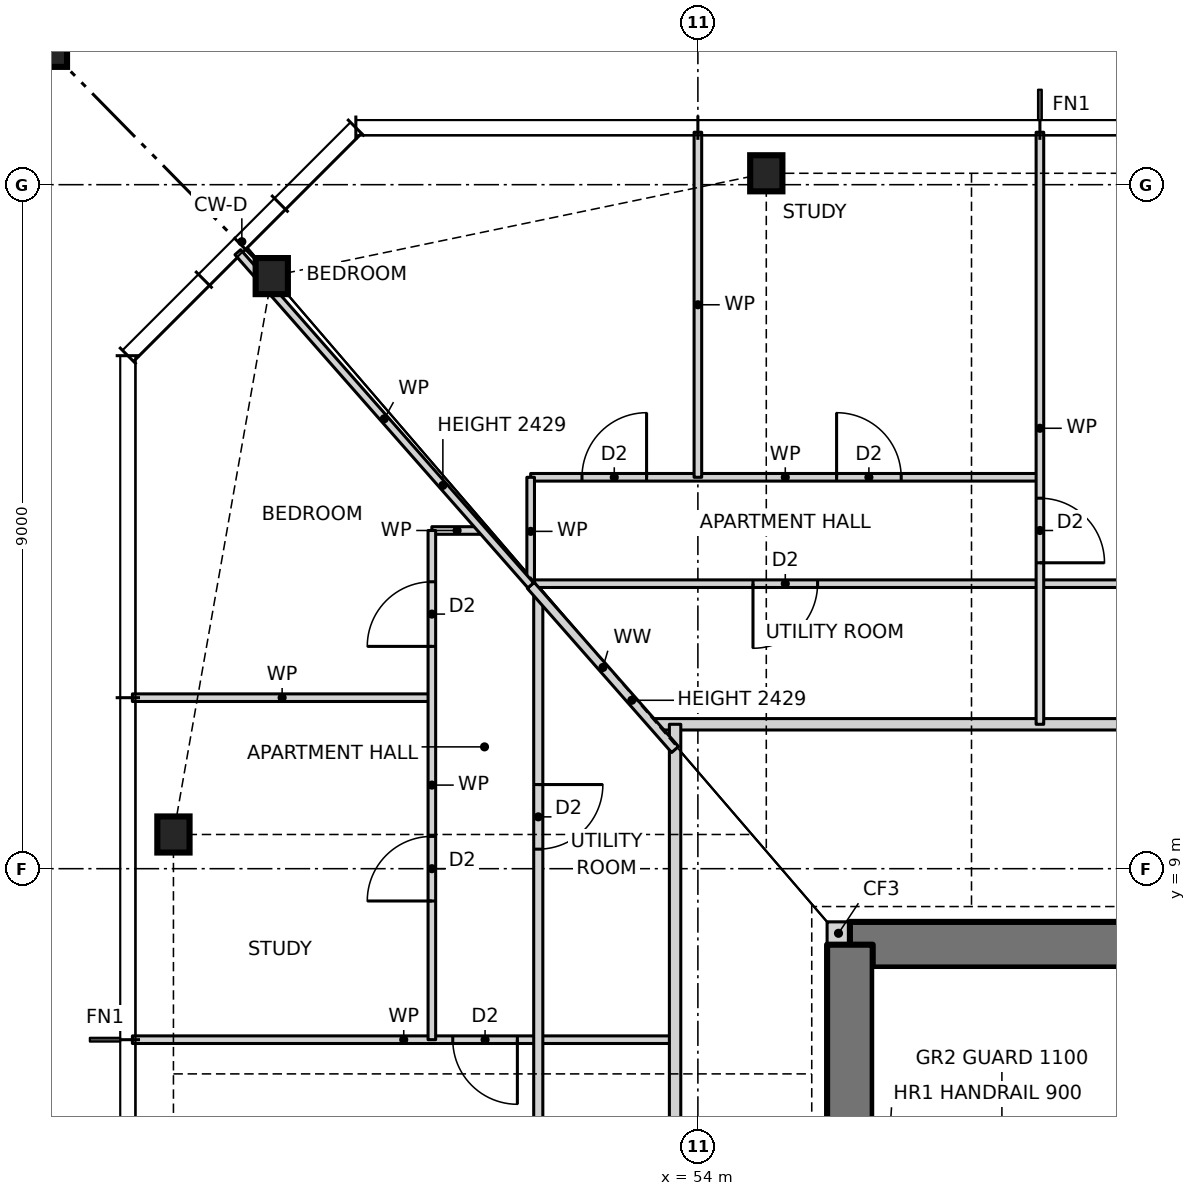
"""IFC4 building model, lengths in metres.
Left out: names, types, materials, properties, quantities, classifications, styles, units other than length and angle.
Written with IfcOpenShell. Run it as: python <this file> out.ifc"""

import sys

from ifc_helpers import new_model, si_unit, direction, frame, frame_2d, origin, origin_2d, place, context, subcontext, project, spatial, rectangle, hollow_rectangle, i_section, extrude, element, fill, save


model = new_model("IFC4")
c1 = context("Model", 3, precision=1e-05, world=origin(), true_north=direction((0.0, 1.0)))
c2 = subcontext(c1, "Body", "Model", "MODEL_VIEW")
j1 = project(units=[si_unit("LENGTHUNIT", "METRE"), si_unit("PLANEANGLEUNIT", "RADIAN")], contexts=[c1])
p1 = place(None, origin())
s1 = spatial("IfcSite", under=j1, at=p1, CompositionType="ELEMENT")
p2 = place(p1, origin())
s2 = spatial("IfcBuilding", under=s1, at=p2, CompositionType="ELEMENT")
p3 = place(p2, frame((0.0, 0.0, 39.5)))
s3 = spatial("IfcBuildingStorey", under=s2, at=p3, CompositionType="ELEMENT", Elevation=39.5)
for number, where, z_axis, x_axis in (
    (1, (54.9, 18.15, 0.0), (0.0, 0.0, 1.0), (1.0, 0.0, 0.0)),
    (2, (48.394, 16.797, 0.0), (0.0, 0.0, 1.0), (1.0, 0.0, 0.0)),
    (3, (47.1, 9.45, 0.0), (0.0, 0.0, 1.0), (1.0, 0.0, 0.0)),
):
    element("IfcColumn", number, at=place(p3, frame(where, z_axis=z_axis, x_axis=x_axis)), inside=s3, PredefinedType="COLUMN", context=c2, shape_type="SweptSolid", body=[
        extrude(i_section(OverallWidth=0.424, OverallDepth=0.475, WebThickness=0.048, FlangeThickness=0.077, at=origin_2d()), origin(), (0.0, 0.0, 1.0), 3.5),
    ])
p4 = place(p3, frame((45.1, 20.15, 0.0), z_axis=(0.0, 0.0, 1.0), x_axis=(1.0, 0.0, 0.0)))
e4 = element("IfcColumn", 4, at=p4, inside=s3, PredefinedType="COLUMN", context=c2, shape_type="SweptSolid", body=[
    extrude(hollow_rectangle(XDim=1.2, YDim=1.2, WallThickness=0.07, at=origin_2d()), origin(), (0.0, 0.0, 1.0), 3.5),
])
p5 = place(p3, frame((55.7, 8.15, 0.0), z_axis=(0.0, 0.0, 1.0), x_axis=(1.0, 0.0, 0.0)))
e5 = element("IfcWall", 5, at=p5, inside=s3, PredefinedType="SOLIDWALL", context=c2, shape_type="SweptSolid", body=[
    extrude(rectangle(XDim=0.3, YDim=0.3, at=frame_2d((0.15, 0.0))), origin(), (0.0, 0.0, 1.0), 3.5),
])
p6 = place(p3, frame((70.0, 8.0, 0.0), z_axis=(0.0, 0.0, 1.0), x_axis=(-1.0, 0.0, 0.0)))
e6 = element("IfcWall", 6, at=p6, inside=s3, PredefinedType="SHEAR", context=c2, shape_type="SweptSolid", body=[
    extrude(rectangle(XDim=14.0, YDim=0.6, at=frame_2d((7.0, 0.0))), origin(), (0.0, 0.0, 1.0), 3.5),
])
p7 = place(p6, frame((8.2, 0.0, 0.0)))
e7 = element("IfcOpeningElement", 7, at=p7, cuts=e6, PredefinedType="OPENING", context=c2, shape_type="SweptSolid", body=[
    extrude(rectangle(XDim=0.9, YDim=2.1, at=frame_2d((0.45, 1.05))), frame((0.0, 0.31, 0.0), z_axis=(0.0, -1.0, 0.0), x_axis=(1.0, 0.0, 0.0)), (0.0, 0.0, 1.0), 0.62),
])
p8 = place(p6, frame((3.2, 0.0, 0.0)))
e8 = element("IfcOpeningElement", 8, at=p8, cuts=e6, PredefinedType="OPENING", context=c2, shape_type="SweptSolid", body=[
    extrude(rectangle(XDim=0.9, YDim=2.1, at=frame_2d((0.45, 1.05))), frame((0.0, 0.31, 0.0), z_axis=(0.0, -1.0, 0.0), x_axis=(1.0, 0.0, 0.0)), (0.0, 0.0, 1.0), 0.62),
])
p9 = place(p3, frame((56.0, 8.0, 0.0), z_axis=(0.0, 0.0, 1.0), x_axis=(0.0, -1.0, 0.0)))
e9 = element("IfcWall", 9, at=p9, inside=s3, PredefinedType="SHEAR", context=c2, shape_type="SweptSolid", body=[
    extrude(rectangle(XDim=16.0, YDim=0.6, at=frame_2d((8.0, 0.0))), origin(), (0.0, 0.0, 1.0), 3.5),
])
p10 = place(p9, frame((7.5, 0.0, 0.0)))
e10 = element("IfcOpeningElement", 10, at=p10, cuts=e9, PredefinedType="OPENING", context=c2, shape_type="SweptSolid", body=[
    extrude(rectangle(XDim=1.0, YDim=2.1, at=frame_2d((0.5, 1.05))), frame((0.0, 0.31, 0.0), z_axis=(0.0, -1.0, 0.0), x_axis=(1.0, 0.0, 0.0)), (0.0, 0.0, 1.0), 0.62),
])
p11 = place(p3, frame((46.56, 6.75, 0.0), z_axis=(0.0, 0.0, 1.0), x_axis=(1.0, 0.0, 0.0)))
e11 = element("IfcWall", 11, at=p11, inside=s3, PredefinedType="PARTITIONING", context=c2, shape_type="SweptSolid", body=[
    extrude(rectangle(XDim=7.14, YDim=0.1, at=frame_2d((3.57, 0.0))), origin(), (0.0, 0.0, 1.0), 3.27),
])
p12 = place(p11, frame((4.215, 0.0, 0.0)))
e12 = element("IfcOpeningElement", 12, at=p12, cuts=e11, PredefinedType="OPENING", context=c2, shape_type="SweptSolid", body=[
    extrude(rectangle(XDim=0.85, YDim=2.1, at=frame_2d((0.425, 1.05))), frame((0.0, 0.06, 0.0), z_axis=(0.0, -1.0, 0.0), x_axis=(1.0, 0.0, 0.0)), (0.0, 0.0, 1.0), 0.12),
])
p13 = place(p3, frame((53.408, 10.9, 0.0), z_axis=(0.0, 0.0, 1.0), x_axis=(1.0, 0.0, 0.0)))
e13 = element("IfcWall", 13, at=p13, inside=s3, PredefinedType="PARTITIONING", context=c2, shape_type="SweptSolid", body=[
    extrude(rectangle(XDim=19.184, YDim=0.15, at=frame_2d((9.592, 0.0))), origin(), (0.0, 0.0, 1.0), 3.27),
])
p14 = place(p13, frame((8.592, 0.0, 0.0)))
e14 = element("IfcOpeningElement", 14, at=p14, cuts=e13, PredefinedType="OPENING", context=c2, shape_type="SweptSolid", body=[
    extrude(rectangle(XDim=1.0, YDim=2.1, at=frame_2d((0.5, 1.05))), frame((0.0, 0.085, 0.0), z_axis=(0.0, -1.0, 0.0), x_axis=(1.0, 0.0, 0.0)), (0.0, 0.0, 1.0), 0.17),
])
p15 = place(p3, frame((46.56, 11.25, 0.0), z_axis=(0.0, 0.0, 1.0), x_axis=(1.0, 0.0, 0.0)))
e15 = element("IfcWall", 15, at=p15, inside=s3, PredefinedType="PARTITIONING", context=c2, shape_type="SweptSolid", body=[
    extrude(rectangle(XDim=3.94, YDim=0.1, at=frame_2d((1.97, 0.0))), origin(), (0.0, 0.0, 1.0), 3.27),
])
p16 = place(p3, frame((51.8, 12.75, 0.0), z_axis=(0.0, 0.0, 1.0), x_axis=(1.0, 0.0, 0.0)))
e16 = element("IfcWall", 16, at=p16, inside=s3, PredefinedType="PARTITIONING", context=c2, shape_type="SweptSolid", body=[
    extrude(rectangle(XDim=22.4, YDim=0.1, at=frame_2d((11.2, 0.0))), origin(), (0.0, 0.0, 1.0), 3.27),
])
p17 = place(p16, frame((13.475, 0.0, 0.0)))
e17 = element("IfcOpeningElement", 17, at=p17, cuts=e16, PredefinedType="OPENING", context=c2, shape_type="SweptSolid", body=[
    extrude(rectangle(XDim=0.85, YDim=2.1, at=frame_2d((0.425, 1.05))), frame((0.0, 0.06, 0.0), z_axis=(0.0, -1.0, 0.0), x_axis=(1.0, 0.0, 0.0)), (0.0, 0.0, 1.0), 0.12),
])
p18 = place(p16, frame((10.275, 0.0, 0.0)))
e18 = element("IfcOpeningElement", 18, at=p18, cuts=e16, PredefinedType="OPENING", context=c2, shape_type="SweptSolid", body=[
    extrude(rectangle(XDim=0.85, YDim=2.1, at=frame_2d((0.425, 1.05))), frame((0.0, 0.06, 0.0), z_axis=(0.0, -1.0, 0.0), x_axis=(1.0, 0.0, 0.0)), (0.0, 0.0, 1.0), 0.12),
])
p19 = place(p16, frame((18.625, 0.0, 0.0)))
e19 = element("IfcOpeningElement", 19, at=p19, cuts=e16, PredefinedType="OPENING", context=c2, shape_type="SweptSolid", body=[
    extrude(rectangle(XDim=0.85, YDim=2.1, at=frame_2d((0.425, 1.05))), frame((0.0, 0.06, 0.0), z_axis=(0.0, -1.0, 0.0), x_axis=(1.0, 0.0, 0.0)), (0.0, 0.0, 1.0), 0.12),
])
p20 = place(p16, frame((2.925, 0.0, 0.0)))
e20 = element("IfcOpeningElement", 20, at=p20, cuts=e16, PredefinedType="OPENING", context=c2, shape_type="SweptSolid", body=[
    extrude(rectangle(XDim=0.85, YDim=2.1, at=frame_2d((0.425, 1.05))), frame((0.0, 0.06, 0.0), z_axis=(0.0, -1.0, 0.0), x_axis=(1.0, 0.0, 0.0)), (0.0, 0.0, 1.0), 0.12),
])
p21 = place(p3, frame((50.5, 13.45, 0.0), z_axis=(0.0, 0.0, 1.0), x_axis=(1.0, 0.0, 0.0)))
e21 = element("IfcWall", 21, at=p21, inside=s3, PredefinedType="PARTITIONING", context=c2, shape_type="SweptSolid", body=[
    extrude(rectangle(XDim=0.664, YDim=0.1, at=frame_2d((0.332, 0.0))), origin(), (0.0, 0.0, 1.0), 3.27),
])
p22 = place(p3, frame((51.8, 14.15, 0.0), z_axis=(0.0, 0.0, 1.0), x_axis=(1.0, 0.0, 0.0)))
e22 = element("IfcWall", 22, at=p22, inside=s3, PredefinedType="PARTITIONING", context=c2, shape_type="SweptSolid", body=[
    extrude(rectangle(XDim=6.7, YDim=0.1, at=frame_2d((3.35, 0.0))), origin(), (0.0, 0.0, 1.0), 3.27),
])
p23 = place(p22, frame((4.025, 0.0, 0.0)))
e23 = element("IfcOpeningElement", 23, at=p23, cuts=e22, PredefinedType="OPENING", context=c2, shape_type="SweptSolid", body=[
    extrude(rectangle(XDim=0.85, YDim=2.1, at=frame_2d((0.425, 1.05))), frame((0.0, 0.06, 0.0), z_axis=(0.0, -1.0, 0.0), x_axis=(1.0, 0.0, 0.0)), (0.0, 0.0, 1.0), 0.12),
])
p24 = place(p22, frame((0.675, 0.0, 0.0)))
e24 = element("IfcOpeningElement", 24, at=p24, cuts=e22, PredefinedType="OPENING", context=c2, shape_type="SweptSolid", body=[
    extrude(rectangle(XDim=0.85, YDim=2.1, at=frame_2d((0.425, 1.05))), frame((0.0, 0.06, 0.0), z_axis=(0.0, -1.0, 0.0), x_axis=(1.0, 0.0, 0.0)), (0.0, 0.0, 1.0), 0.12),
])
p25 = place(p3, frame((58.5, 10.9, 0.0), z_axis=(0.0, 0.0, 1.0), x_axis=(0.0, 1.0, 0.0)))
e25 = element("IfcWall", 25, at=p25, inside=s3, PredefinedType="PARTITIONING", context=c2, shape_type="SweptSolid", body=[
    extrude(rectangle(XDim=7.79, YDim=0.1, at=frame_2d((3.895, 0.0))), origin(), (0.0, 0.0, 1.0), 3.27),
])
p26 = place(p25, frame((2.125, 0.0, 0.0)))
e26 = element("IfcOpeningElement", 26, at=p26, cuts=e25, PredefinedType="OPENING", context=c2, shape_type="SweptSolid", body=[
    extrude(rectangle(XDim=0.85, YDim=2.1, at=frame_2d((0.425, 1.05))), frame((0.0, 0.06, 0.0), z_axis=(0.0, -1.0, 0.0), x_axis=(1.0, 0.0, 0.0)), (0.0, 0.0, 1.0), 0.12),
])
p27 = place(p3, frame((54.0, 14.15, 0.0), z_axis=(0.0, 0.0, 1.0), x_axis=(0.0, 1.0, 0.0)))
e27 = element("IfcWall", 27, at=p27, inside=s3, PredefinedType="PARTITIONING", context=c2, shape_type="SweptSolid", body=[
    extrude(rectangle(XDim=4.54, YDim=0.1, at=frame_2d((2.27, 0.0))), origin(), (0.0, 0.0, 1.0), 3.27),
])
p28 = place(p3, frame((53.7, -10.568, 0.0), z_axis=(0.0, 0.0, 1.0), x_axis=(0.0, 1.0, 0.0)))
e28 = element("IfcWall", 28, at=p28, inside=s3, PredefinedType="PARTITIONING", context=c2, shape_type="SweptSolid", body=[
    extrude(rectangle(XDim=21.468, YDim=0.15, at=frame_2d((10.734, 0.0))), origin(), (0.0, 0.0, 1.0), 3.27),
])
p29 = place(p28, frame((11.818, 0.0, 0.0)))
e29 = element("IfcOpeningElement", 29, at=p29, cuts=e28, PredefinedType="OPENING", context=c2, shape_type="SweptSolid", body=[
    extrude(rectangle(XDim=1.0, YDim=2.1, at=frame_2d((0.5, 1.05))), frame((0.0, 0.085, 0.0), z_axis=(0.0, -1.0, 0.0), x_axis=(1.0, 0.0, 0.0)), (0.0, 0.0, 1.0), 0.17),
])
p30 = place(p3, frame((51.9, -12.614, 0.0), z_axis=(0.0, 0.0, 1.0), x_axis=(0.0, 1.0, 0.0)))
e30 = element("IfcWall", 30, at=p30, inside=s3, PredefinedType="PARTITIONING", context=c2, shape_type="SweptSolid", body=[
    extrude(rectangle(XDim=25.228, YDim=0.12, at=frame_2d((12.614, 0.0))), origin(), (0.0, 0.0, 1.0), 3.27),
])
p31 = place(p30, frame((17.139, 0.0, 0.0)))
e31 = element("IfcOpeningElement", 31, at=p31, cuts=e30, PredefinedType="OPENING", context=c2, shape_type="SweptSolid", body=[
    extrude(rectangle(XDim=0.85, YDim=2.1, at=frame_2d((0.425, 1.05))), frame((0.0, 0.07, 0.0), z_axis=(0.0, -1.0, 0.0), x_axis=(1.0, 0.0, 0.0)), (0.0, 0.0, 1.0), 0.14),
])
p32 = place(p30, frame((13.939, 0.0, 0.0)))
e32 = element("IfcOpeningElement", 32, at=p32, cuts=e30, PredefinedType="OPENING", context=c2, shape_type="SweptSolid", body=[
    extrude(rectangle(XDim=0.85, YDim=2.1, at=frame_2d((0.425, 1.05))), frame((0.0, 0.07, 0.0), z_axis=(0.0, -1.0, 0.0), x_axis=(1.0, 0.0, 0.0)), (0.0, 0.0, 1.0), 0.14),
])
p33 = place(p30, frame((21.871, 0.0, 0.0)))
e33 = element("IfcOpeningElement", 33, at=p33, cuts=e30, PredefinedType="OPENING", context=c2, shape_type="SweptSolid", body=[
    extrude(rectangle(XDim=0.85, YDim=2.1, at=frame_2d((0.425, 1.05))), frame((0.0, 0.07, 0.0), z_axis=(0.0, -1.0, 0.0), x_axis=(1.0, 0.0, 0.0)), (0.0, 0.0, 1.0), 0.14),
])
p34 = place(p30, frame((7.739, 0.0, 0.0)))
e34 = element("IfcOpeningElement", 34, at=p34, cuts=e30, PredefinedType="OPENING", context=c2, shape_type="SweptSolid", body=[
    extrude(rectangle(XDim=0.85, YDim=2.1, at=frame_2d((0.425, 1.05))), frame((0.0, 0.07, 0.0), z_axis=(0.0, -1.0, 0.0), x_axis=(1.0, 0.0, 0.0)), (0.0, 0.0, 1.0), 0.14),
])
p35 = place(p30, frame((2.557, 0.0, 0.0)))
e35 = element("IfcOpeningElement", 35, at=p35, cuts=e30, PredefinedType="OPENING", context=c2, shape_type="SweptSolid", body=[
    extrude(rectangle(XDim=0.85, YDim=2.1, at=frame_2d((0.425, 1.05))), frame((0.0, 0.07, 0.0), z_axis=(0.0, -1.0, 0.0), x_axis=(1.0, 0.0, 0.0)), (0.0, 0.0, 1.0), 0.14),
])
p36 = place(p3, frame((51.8, 12.727, 0.0), z_axis=(0.0, 0.0, 1.0), x_axis=(0.0, 1.0, 0.0)))
e36 = element("IfcWall", 36, at=p36, inside=s3, PredefinedType="PARTITIONING", context=c2, shape_type="SweptSolid", body=[
    extrude(rectangle(XDim=1.423, YDim=0.1, at=frame_2d((0.711, 0.0))), origin(), (0.0, 0.0, 1.0), 3.27),
])
p37 = place(p3, frame((50.5, 6.75, 0.0), z_axis=(0.0, 0.0, 1.0), x_axis=(0.0, 1.0, 0.0)))
e37 = element("IfcWall", 37, at=p37, inside=s3, PredefinedType="PARTITIONING", context=c2, shape_type="SweptSolid", body=[
    extrude(rectangle(XDim=6.7, YDim=0.1, at=frame_2d((3.35, 0.0))), origin(), (0.0, 0.0, 1.0), 3.27),
])
p38 = place(p37, frame((1.825, 0.0, 0.0)))
e38 = element("IfcOpeningElement", 38, at=p38, cuts=e37, PredefinedType="OPENING", context=c2, shape_type="SweptSolid", body=[
    extrude(rectangle(XDim=0.85, YDim=2.1, at=frame_2d((0.425, 1.05))), frame((0.0, 0.06, 0.0), z_axis=(0.0, -1.0, 0.0), x_axis=(1.0, 0.0, 0.0)), (0.0, 0.0, 1.0), 0.12),
])
p39 = place(p37, frame((5.175, 0.0, 0.0)))
e39 = element("IfcOpeningElement", 39, at=p39, cuts=e37, PredefinedType="OPENING", context=c2, shape_type="SweptSolid", body=[
    extrude(rectangle(XDim=0.85, YDim=2.1, at=frame_2d((0.425, 1.05))), frame((0.0, 0.06, 0.0), z_axis=(0.0, -1.0, 0.0), x_axis=(1.0, 0.0, 0.0)), (0.0, 0.0, 1.0), 0.12),
])
p40 = place(p3, frame((53.7, 10.568, 0.0), z_axis=(0.0, 0.0, 1.0), x_axis=(-0.660275707921, 0.751023294931, 0.0)))
e40 = element("IfcWall", 40, at=p40, inside=s3, PredefinedType="PARTITIONING", context=c2, shape_type="SweptSolid", body=[
    extrude(rectangle(XDim=2.876, YDim=0.12, at=frame_2d((1.438, 0.0))), origin(), (0.0, 0.0, 1.0), 2.429),
])
p41 = place(p3, frame((51.801, 12.728, 0.0), z_axis=(0.0, 0.0, 1.0), x_axis=(-0.660267638736, 0.751030389024, 0.0)))
e41 = element("IfcWall", 41, at=p41, inside=s3, PredefinedType="PARTITIONING", context=c2, shape_type="SweptSolid", body=[
    extrude(rectangle(XDim=5.837, YDim=0.1, at=frame_2d((2.918, 0.0))), origin(), (0.0, 0.0, 1.0), 2.429),
])
p42 = place(p26, frame((0.85, 0.0, 0.0), z_axis=(0.0, 0.0, 1.0), x_axis=(-1.0, 0.0, 0.0)))
e42 = element("IfcDoor", 42, at=p42, inside=s3, OperationType="SINGLE_SWING_RIGHT", PredefinedType="DOOR", context=c2, shape_type="SweptSolid", body=[
    extrude(rectangle(XDim=0.85, YDim=2.1, at=frame_2d((0.425, 1.05))), frame((0.0, 0.025, 0.0), z_axis=(0.0, -1.0, 0.0), x_axis=(1.0, 0.0, 0.0)), (0.0, 0.0, 1.0), 0.05),
])
fill(e26, e42)
p43 = place(p23, origin())
e43 = element("IfcDoor", 43, at=p43, inside=s3, OperationType="SINGLE_SWING_LEFT", PredefinedType="DOOR", context=c2, shape_type="SweptSolid", body=[
    extrude(rectangle(XDim=0.85, YDim=2.1, at=frame_2d((0.425, 1.05))), frame((0.0, 0.025, 0.0), z_axis=(0.0, -1.0, 0.0), x_axis=(1.0, 0.0, 0.0)), (0.0, 0.0, 1.0), 0.05),
])
fill(e23, e43)
p44 = place(p24, origin())
e44 = element("IfcDoor", 44, at=p44, inside=s3, OperationType="SINGLE_SWING_RIGHT", PredefinedType="DOOR", context=c2, shape_type="SweptSolid", body=[
    extrude(rectangle(XDim=0.85, YDim=2.1, at=frame_2d((0.425, 1.05))), frame((0.0, 0.025, 0.0), z_axis=(0.0, -1.0, 0.0), x_axis=(1.0, 0.0, 0.0)), (0.0, 0.0, 1.0), 0.05),
])
fill(e24, e44)
p45 = place(p20, frame((0.85, 0.0, 0.0), z_axis=(0.0, 0.0, 1.0), x_axis=(-1.0, 0.0, 0.0)))
e45 = element("IfcDoor", 45, at=p45, inside=s3, OperationType="SINGLE_SWING_RIGHT", PredefinedType="DOOR", context=c2, shape_type="SweptSolid", body=[
    extrude(rectangle(XDim=0.85, YDim=2.1, at=frame_2d((0.425, 1.05))), frame((0.0, 0.025, 0.0), z_axis=(0.0, -1.0, 0.0), x_axis=(1.0, 0.0, 0.0)), (0.0, 0.0, 1.0), 0.05),
])
fill(e20, e45)
p46 = place(p12, frame((0.85, 0.0, 0.0), z_axis=(0.0, 0.0, 1.0), x_axis=(-1.0, 0.0, 0.0)))
e46 = element("IfcDoor", 46, at=p46, inside=s3, OperationType="SINGLE_SWING_LEFT", PredefinedType="DOOR", context=c2, shape_type="SweptSolid", body=[
    extrude(rectangle(XDim=0.85, YDim=2.1, at=frame_2d((0.425, 1.05))), frame((0.0, 0.025, 0.0), z_axis=(0.0, -1.0, 0.0), x_axis=(1.0, 0.0, 0.0)), (0.0, 0.0, 1.0), 0.05),
])
fill(e12, e46)
p47 = place(p38, origin())
e47 = element("IfcDoor", 47, at=p47, inside=s3, OperationType="SINGLE_SWING_LEFT", PredefinedType="DOOR", context=c2, shape_type="SweptSolid", body=[
    extrude(rectangle(XDim=0.85, YDim=2.1, at=frame_2d((0.425, 1.05))), frame((0.0, 0.025, 0.0), z_axis=(0.0, -1.0, 0.0), x_axis=(1.0, 0.0, 0.0)), (0.0, 0.0, 1.0), 0.05),
])
fill(e38, e47)
p48 = place(p39, origin())
e48 = element("IfcDoor", 48, at=p48, inside=s3, OperationType="SINGLE_SWING_LEFT", PredefinedType="DOOR", context=c2, shape_type="SweptSolid", body=[
    extrude(rectangle(XDim=0.85, YDim=2.1, at=frame_2d((0.425, 1.05))), frame((0.0, 0.025, 0.0), z_axis=(0.0, -1.0, 0.0), x_axis=(1.0, 0.0, 0.0)), (0.0, 0.0, 1.0), 0.05),
])
fill(e39, e48)
p49 = place(p33, frame((0.85, 0.0, 0.0), z_axis=(0.0, 0.0, 1.0), x_axis=(-1.0, 0.0, 0.0)))
e49 = element("IfcDoor", 49, at=p49, inside=s3, OperationType="SINGLE_SWING_LEFT", PredefinedType="DOOR", context=c2, shape_type="SweptSolid", body=[
    extrude(rectangle(XDim=0.85, YDim=2.1, at=frame_2d((0.425, 1.05))), frame((0.0, 0.025, 0.0), z_axis=(0.0, -1.0, 0.0), x_axis=(1.0, 0.0, 0.0)), (0.0, 0.0, 1.0), 0.05),
])
fill(e33, e49)
save(model, sys.argv[1])
